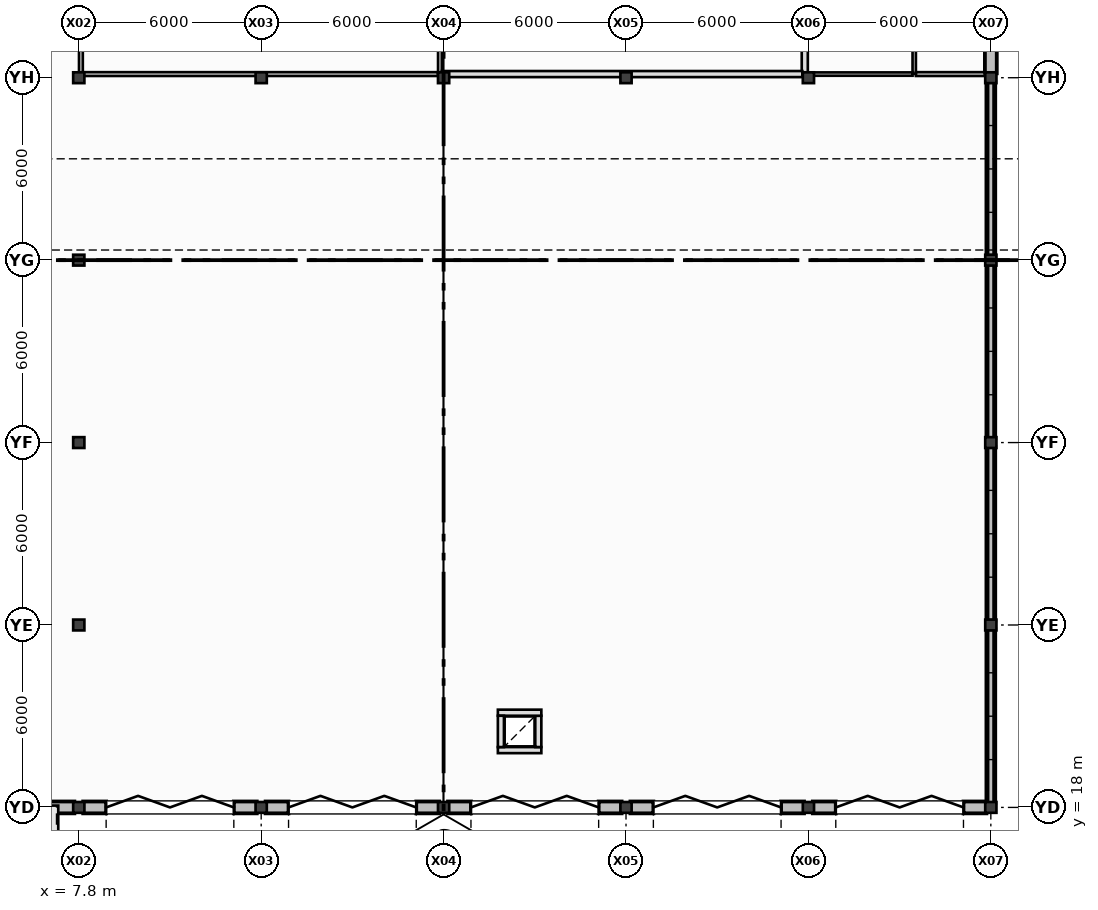
"""IFC4 building model, lengths in metres.
Left out: names, types, materials, properties, quantities, classifications, styles, units other than length and angle.
Written with IfcOpenShell. Run it as: python <this file> out.ifc"""

import sys

from ifc_helpers import new_model, si_unit, direction, frame, frame_2d, origin, origin_2d, place, context, subcontext, project, spatial, rectangle, i_section, extrude, element, fill, save


model = new_model("IFC4")
c1 = context("Model", 3, precision=1e-05, world=origin(), true_north=direction((0.0, 1.0)))
c2 = subcontext(c1, "Body", "Model", "MODEL_VIEW")
j1 = project(units=[si_unit("LENGTHUNIT", "METRE"), si_unit("PLANEANGLEUNIT", "RADIAN")], contexts=[c1])
p1 = place(None, origin())
s1 = spatial("IfcSite", under=j1, at=p1, CompositionType="ELEMENT")
p2 = place(p1, origin())
s2 = spatial("IfcBuilding", under=s1, at=p2, CompositionType="ELEMENT")
p3 = place(p2, origin())
s3 = spatial("IfcBuildingStorey", under=s2, at=p3, CompositionType="ELEMENT", Elevation=0.0)
for number, where, z_axis, x_axis in (
    (1, (7.8, 18.0, -0.41), (0.0, 0.0, 1.0), (1.0, 0.0, 0.0)),
    (2, (7.8, 24.0, -0.41), (0.0, 0.0, 1.0), (1.0, 0.0, 0.0)),
    (3, (7.8, 30.0, -0.41), (0.0, 0.0, 1.0), (1.0, 0.0, 0.0)),
    (4, (7.8, 36.0, -0.41), (0.0, 0.0, 1.0), (1.0, 0.0, 0.0)),
    (5, (7.8, 42.0, -0.41), (0.0, 0.0, 1.0), (1.0, 0.0, 0.0)),
    (6, (13.8, 18.0, -0.41), (0.0, 0.0, 1.0), (1.0, 0.0, 0.0)),
    (7, (13.8, 42.0, -0.41), (0.0, 0.0, 1.0), (1.0, 0.0, 0.0)),
    (8, (19.8, 18.0, -0.41), (0.0, 0.0, 1.0), (1.0, 0.0, 0.0)),
    (9, (19.8, 42.0, -0.41), (0.0, 0.0, 1.0), (1.0, 0.0, 0.0)),
    (10, (25.8, 18.0, -0.41), (0.0, 0.0, 1.0), (1.0, 0.0, 0.0)),
    (11, (25.8, 42.0, -0.41), (0.0, 0.0, 1.0), (1.0, 0.0, 0.0)),
    (12, (31.8, 18.0, -0.41), (0.0, 0.0, 1.0), (1.0, 0.0, 0.0)),
    (13, (31.8, 42.0, -0.41), (0.0, 0.0, 1.0), (1.0, 0.0, 0.0)),
    (14, (37.8, 18.0, -0.41), (0.0, 0.0, 1.0), (1.0, 0.0, 0.0)),
    (15, (37.8, 24.0, -0.41), (0.0, 0.0, 1.0), (1.0, 0.0, 0.0)),
    (16, (37.8, 30.0, -0.41), (0.0, 0.0, 1.0), (1.0, 0.0, 0.0)),
    (17, (37.8, 36.0, -0.41), (0.0, 0.0, 1.0), (1.0, 0.0, 0.0)),
    (18, (37.8, 42.0, -0.41), (0.0, 0.0, 1.0), (1.0, 0.0, 0.0)),
):
    element("IfcColumn", number, at=place(p3, frame(where, z_axis=z_axis, x_axis=x_axis)), inside=s3, PredefinedType="COLUMN", context=c2, shape_type="SweptSolid", body=[
        extrude(i_section(OverallWidth=0.369, OverallDepth=0.356, WebThickness=0.011, FlangeThickness=0.018, at=origin_2d()), origin(), (0.0, 0.0, 1.0), 6.41),
    ])
p4 = place(p3, frame((1.945, 18.0, 0.0), z_axis=(0.0, 0.0, 1.0), x_axis=(1.0, 0.0, 0.0)))
e19 = element("IfcWall", 19, at=p4, inside=s3, PredefinedType="STANDARD", context=c2, shape_type="SweptSolid", body=[
    extrude(rectangle(XDim=5.71, YDim=0.39, at=frame_2d((2.855, 0.0))), origin(), (0.0, 0.0, 1.0), 5.433),
])
p5 = place(p4, frame((2.93, 0.0, 0.0)))
e20 = element("IfcOpeningElement", 20, at=p5, cuts=e19, PredefinedType="OPENING", context=c2, shape_type="SweptSolid", body=[
    extrude(rectangle(XDim=1.95, YDim=2.35, at=frame_2d((0.975, 1.175))), frame((0.0, 0.205, 0.0), z_axis=(0.0, -1.0, 0.0), x_axis=(1.0, 0.0, 0.0)), (0.0, 0.0, 1.0), 0.41),
])
p6 = place(p3, frame((7.945, 18.0, 0.0), z_axis=(0.0, 0.0, 1.0), x_axis=(1.0, 0.0, 0.0)))
e21 = element("IfcWall", 21, at=p6, inside=s3, PredefinedType="STANDARD", context=c2, shape_type="SweptSolid", body=[
    extrude(rectangle(XDim=5.71, YDim=0.39, at=frame_2d((2.855, 0.0))), origin(), (0.0, 0.0, 1.0), 6.0),
])
p7 = place(p6, frame((0.755, 0.0, 0.0)))
e22 = element("IfcOpeningElement", 22, at=p7, cuts=e21, PredefinedType="OPENING", context=c2, shape_type="SweptSolid", body=[
    extrude(rectangle(XDim=4.2, YDim=4.45, at=frame_2d((2.1, 2.225))), frame((0.0, 0.205, 0.0), z_axis=(0.0, -1.0, 0.0), x_axis=(1.0, 0.0, 0.0)), (0.0, 0.0, 1.0), 0.41),
])
p8 = place(p3, frame((13.945, 18.0, 0.0), z_axis=(0.0, 0.0, 1.0), x_axis=(1.0, 0.0, 0.0)))
e23 = element("IfcWall", 23, at=p8, inside=s3, PredefinedType="STANDARD", context=c2, shape_type="SweptSolid", body=[
    extrude(rectangle(XDim=5.71, YDim=0.39, at=frame_2d((2.855, 0.0))), origin(), (0.0, 0.0, 1.0), 6.0),
])
p9 = place(p8, frame((0.755, 0.0, 0.0)))
e24 = element("IfcOpeningElement", 24, at=p9, cuts=e23, PredefinedType="OPENING", context=c2, shape_type="SweptSolid", body=[
    extrude(rectangle(XDim=4.2, YDim=4.45, at=frame_2d((2.1, 2.225))), frame((0.0, 0.205, 0.0), z_axis=(0.0, -1.0, 0.0), x_axis=(1.0, 0.0, 0.0)), (0.0, 0.0, 1.0), 0.41),
])
p10 = place(p3, frame((19.945, 18.0, 0.0), z_axis=(0.0, 0.0, 1.0), x_axis=(1.0, 0.0, 0.0)))
e25 = element("IfcWall", 25, at=p10, inside=s3, PredefinedType="STANDARD", context=c2, shape_type="SweptSolid", body=[
    extrude(rectangle(XDim=5.71, YDim=0.39, at=frame_2d((2.855, 0.0))), origin(), (0.0, 0.0, 1.0), 6.0),
])
p11 = place(p10, frame((0.755, 0.0, 0.0)))
e26 = element("IfcOpeningElement", 26, at=p11, cuts=e25, PredefinedType="OPENING", context=c2, shape_type="SweptSolid", body=[
    extrude(rectangle(XDim=4.2, YDim=4.45, at=frame_2d((2.1, 2.225))), frame((0.0, 0.205, 0.0), z_axis=(0.0, -1.0, 0.0), x_axis=(1.0, 0.0, 0.0)), (0.0, 0.0, 1.0), 0.41),
])
p12 = place(p3, frame((25.945, 18.0, 0.0), z_axis=(0.0, 0.0, 1.0), x_axis=(1.0, 0.0, 0.0)))
e27 = element("IfcWall", 27, at=p12, inside=s3, PredefinedType="STANDARD", context=c2, shape_type="SweptSolid", body=[
    extrude(rectangle(XDim=5.71, YDim=0.39, at=frame_2d((2.855, 0.0))), origin(), (0.0, 0.0, 1.0), 6.0),
])
p13 = place(p12, frame((0.755, 0.0, 0.0)))
e28 = element("IfcOpeningElement", 28, at=p13, cuts=e27, PredefinedType="OPENING", context=c2, shape_type="SweptSolid", body=[
    extrude(rectangle(XDim=4.2, YDim=4.45, at=frame_2d((2.1, 2.225))), frame((0.0, 0.205, 0.0), z_axis=(0.0, -1.0, 0.0), x_axis=(1.0, 0.0, 0.0)), (0.0, 0.0, 1.0), 0.41),
])
p14 = place(p3, frame((31.945, 18.0, 0.0), z_axis=(0.0, 0.0, 1.0), x_axis=(1.0, 0.0, 0.0)))
e29 = element("IfcWall", 29, at=p14, inside=s3, PredefinedType="STANDARD", context=c2, shape_type="SweptSolid", body=[
    extrude(rectangle(XDim=5.71, YDim=0.39, at=frame_2d((2.855, 0.0))), origin(), (0.0, 0.0, 1.0), 6.0),
])
p15 = place(p14, frame((0.755, 0.0, 0.0)))
e30 = element("IfcOpeningElement", 30, at=p15, cuts=e29, PredefinedType="OPENING", context=c2, shape_type="SweptSolid", body=[
    extrude(rectangle(XDim=4.2, YDim=4.45, at=frame_2d((2.1, 2.225))), frame((0.0, 0.205, 0.0), z_axis=(0.0, -1.0, 0.0), x_axis=(1.0, 0.0, 0.0)), (0.0, 0.0, 1.0), 0.41),
])
p16 = place(p3, frame((37.8, 18.145, 0.0), z_axis=(0.0, 0.0, 1.0), x_axis=(0.0, 1.0, 0.0)))
e31 = element("IfcWall", 31, at=p16, inside=s3, PredefinedType="STANDARD", context=c2, shape_type="SweptSolid", body=[
    extrude(rectangle(XDim=5.71, YDim=0.29, at=frame_2d((2.855, 0.0))), origin(), (0.0, 0.0, 1.0), 0.92),
])
p17 = place(p3, frame((37.8, 24.145, 0.0), z_axis=(0.0, 0.0, 1.0), x_axis=(0.0, 1.0, 0.0)))
e32 = element("IfcWall", 32, at=p17, inside=s3, PredefinedType="STANDARD", context=c2, shape_type="SweptSolid", body=[
    extrude(rectangle(XDim=5.71, YDim=0.29, at=frame_2d((2.855, 0.0))), origin(), (0.0, 0.0, 1.0), 0.32),
])
p18 = place(p3, frame((37.8, 30.145, 0.0), z_axis=(0.0, 0.0, 1.0), x_axis=(0.0, 1.0, 0.0)))
e33 = element("IfcWall", 33, at=p18, inside=s3, PredefinedType="STANDARD", context=c2, shape_type="SweptSolid", body=[
    extrude(rectangle(XDim=5.71, YDim=0.29, at=frame_2d((2.855, 0.0))), origin(), (0.0, 0.0, 1.0), 0.44),
])
p19 = place(p3, frame((37.8, 36.145, 0.0), z_axis=(0.0, 0.0, 1.0), x_axis=(0.0, 1.0, 0.0)))
e34 = element("IfcWall", 34, at=p19, inside=s3, PredefinedType="STANDARD", context=c2, shape_type="SweptSolid", body=[
    extrude(rectangle(XDim=5.71, YDim=0.29, at=frame_2d((2.855, 0.0))), origin(), (0.0, 0.0, 1.0), 0.56),
])
p20 = place(p3, frame((37.8, 42.145, 0.0), z_axis=(0.0, 0.0, 1.0), x_axis=(0.0, 1.0, 0.0)))
e35 = element("IfcWall", 35, at=p20, inside=s3, PredefinedType="STANDARD", context=c2, shape_type="SweptSolid", body=[
    extrude(rectangle(XDim=5.71, YDim=0.39, at=frame_2d((2.855, 0.0))), origin(), (0.0, 0.0, 1.0), 5.044),
])
p21 = place(p3, frame((21.585, 19.885, 0.0), z_axis=(0.0, 0.0, 1.0), x_axis=(1.0, 0.0, 0.0)))
e36 = element("IfcWall", 36, at=p21, inside=s3, PredefinedType="PARTITIONING", context=c2, shape_type="SweptSolid", body=[
    extrude(rectangle(XDim=1.43, YDim=0.2, at=frame_2d((0.715, 0.0))), origin(), (0.0, 0.0, 1.0), 5.68),
])
p22 = place(p3, frame((22.915, 19.985, 0.0), z_axis=(0.0, 0.0, 1.0), x_axis=(0.0, 1.0, 0.0)))
e37 = element("IfcWall", 37, at=p22, inside=s3, PredefinedType="PARTITIONING", context=c2, shape_type="SweptSolid", body=[
    extrude(rectangle(XDim=1.03, YDim=0.2, at=frame_2d((0.515, 0.0))), origin(), (0.0, 0.0, 1.0), 5.68),
])
p23 = place(p3, frame((23.015, 21.115, 0.0), z_axis=(0.0, 0.0, 1.0), x_axis=(-1.0, 0.0, 0.0)))
e38 = element("IfcWall", 38, at=p23, inside=s3, PredefinedType="PARTITIONING", context=c2, shape_type="SweptSolid", body=[
    extrude(rectangle(XDim=1.43, YDim=0.2, at=frame_2d((0.715, 0.0))), origin(), (0.0, 0.0, 1.0), 5.68),
])
p24 = place(p3, frame((21.685, 21.015, 0.0), z_axis=(0.0, 0.0, 1.0), x_axis=(0.0, -1.0, 0.0)))
e39 = element("IfcWall", 39, at=p24, inside=s3, PredefinedType="PARTITIONING", context=c2, shape_type="SweptSolid", body=[
    extrude(rectangle(XDim=1.03, YDim=0.2, at=frame_2d((0.515, 0.0))), origin(), (0.0, 0.0, 1.0), 5.68),
])
p25 = place(p3, frame((7.87, 42.117, 0.0), z_axis=(0.0, 0.0, 1.0), x_axis=(0.0, 1.0, 0.0)))
e40 = element("IfcWall", 40, at=p25, inside=s3, PredefinedType="PARTITIONING", context=c2, shape_type="SweptSolid", body=[
    extrude(rectangle(XDim=6.015, YDim=0.125, at=frame_2d((3.008, 0.0))), origin(), (0.0, 0.0, 1.0), 5.044),
])
p26 = place(p25, frame((2.218, 0.0, 0.0)))
e41 = element("IfcOpeningElement", 41, at=p26, cuts=e40, PredefinedType="OPENING", context=c2, shape_type="SweptSolid", body=[
    extrude(rectangle(XDim=1.58, YDim=2.2, at=frame_2d((0.79, 1.1))), frame((0.0, 0.073, 0.0), z_axis=(0.0, -1.0, 0.0), x_axis=(1.0, 0.0, 0.0)), (0.0, 0.0, 1.0), 0.145),
])
p27 = place(p3, frame((19.68, 48.05, 0.0), z_axis=(0.0, 0.0, 1.0), x_axis=(0.0, -1.0, 0.0)))
e42 = element("IfcWall", 42, at=p27, inside=s3, PredefinedType="PARTITIONING", context=c2, shape_type="SweptSolid", body=[
    extrude(rectangle(XDim=5.933, YDim=0.125, at=frame_2d((2.966, 0.0))), origin(), (0.0, 0.0, 1.0), 5.044),
])
p28 = place(p3, frame((19.617, 42.12, 0.0), z_axis=(0.0, 0.0, 1.0), x_axis=(-1.0, 0.0, 0.0)))
e43 = element("IfcWall", 43, at=p28, inside=s3, PredefinedType="PARTITIONING", context=c2, shape_type="SweptSolid", body=[
    extrude(rectangle(XDim=11.685, YDim=0.125, at=frame_2d((5.842, 0.0))), origin(), (0.0, 0.0, 1.0), 5.113),
])
p29 = place(p3, frame((31.68, 48.05, 0.0), z_axis=(0.0, 0.0, 1.0), x_axis=(0.0, -1.0, 0.0)))
e44 = element("IfcWall", 44, at=p29, inside=s3, PredefinedType="PARTITIONING", context=c2, shape_type="SweptSolid", body=[
    extrude(rectangle(XDim=5.97, YDim=0.2, at=frame_2d((2.985, 0.0))), origin(), (0.0, 0.0, 1.0), 5.044),
])
p30 = place(p3, frame((31.6, 42.12, 0.0), z_axis=(0.0, 0.0, 1.0), x_axis=(-1.0, 0.0, 0.0)))
e45 = element("IfcWall", 45, at=p30, inside=s3, PredefinedType="PARTITIONING", context=c2, shape_type="SweptSolid", body=[
    extrude(rectangle(XDim=11.858, YDim=0.2, at=frame_2d((5.929, 0.0))), origin(), (0.0, 0.0, 1.0), 5.113),
])
p31 = place(p3, frame((35.28, 48.05, 0.0), z_axis=(0.0, 0.0, 1.0), x_axis=(0.0, -1.0, 0.0)))
e46 = element("IfcWall", 46, at=p31, inside=s3, PredefinedType="PARTITIONING", context=c2, shape_type="SweptSolid", body=[
    extrude(rectangle(XDim=5.925, YDim=0.11, at=frame_2d((2.962, 0.0))), origin(), (0.0, 0.0, 1.0), 5.68),
])
p32 = place(p3, frame((35.225, 42.12, 0.0), z_axis=(0.0, 0.0, 1.0), x_axis=(-1.0, 0.0, 0.0)))
e47 = element("IfcWall", 47, at=p32, inside=s3, PredefinedType="PARTITIONING", context=c2, shape_type="SweptSolid", body=[
    extrude(rectangle(XDim=3.445, YDim=0.11, at=frame_2d((1.723, 0.0))), origin(), (0.0, 0.0, 1.0), 5.113),
])
p33 = place(p3, frame((37.605, 42.12, 0.0), z_axis=(0.0, 0.0, 1.0), x_axis=(-1.0, 0.0, 0.0)))
e48 = element("IfcWall", 48, at=p33, inside=s3, PredefinedType="PARTITIONING", context=c2, shape_type="SweptSolid", body=[
    extrude(rectangle(XDim=2.27, YDim=0.125, at=frame_2d((1.135, 0.0))), origin(), (0.0, 0.0, 1.0), 5.113),
])
p34 = place(p7, frame((4.2, 0.0, 0.0), z_axis=(0.0, 0.0, 1.0), x_axis=(-1.0, 0.0, 0.0)))
e49 = element("IfcDoor", 49, at=p34, inside=s3, OperationType="ROLLINGUP", PredefinedType="DOOR", context=c2, shape_type="SweptSolid", body=[
    extrude(rectangle(XDim=4.2, YDim=4.45, at=frame_2d((2.1, 2.225))), frame((0.0, 0.025, 0.0), z_axis=(0.0, -1.0, 0.0), x_axis=(1.0, 0.0, 0.0)), (0.0, 0.0, 1.0), 0.05),
])
fill(e22, e49)
p35 = place(p9, frame((4.2, 0.0, 0.0), z_axis=(0.0, 0.0, 1.0), x_axis=(-1.0, 0.0, 0.0)))
e50 = element("IfcDoor", 50, at=p35, inside=s3, OperationType="ROLLINGUP", PredefinedType="DOOR", context=c2, shape_type="SweptSolid", body=[
    extrude(rectangle(XDim=4.2, YDim=4.45, at=frame_2d((2.1, 2.225))), frame((0.0, 0.025, 0.0), z_axis=(0.0, -1.0, 0.0), x_axis=(1.0, 0.0, 0.0)), (0.0, 0.0, 1.0), 0.05),
])
fill(e24, e50)
p36 = place(p11, frame((4.2, 0.0, 0.0), z_axis=(0.0, 0.0, 1.0), x_axis=(-1.0, 0.0, 0.0)))
e51 = element("IfcDoor", 51, at=p36, inside=s3, OperationType="ROLLINGUP", PredefinedType="DOOR", context=c2, shape_type="SweptSolid", body=[
    extrude(rectangle(XDim=4.2, YDim=4.45, at=frame_2d((2.1, 2.225))), frame((0.0, 0.025, 0.0), z_axis=(0.0, -1.0, 0.0), x_axis=(1.0, 0.0, 0.0)), (0.0, 0.0, 1.0), 0.05),
])
fill(e26, e51)
p37 = place(p13, frame((4.2, 0.0, 0.0), z_axis=(0.0, 0.0, 1.0), x_axis=(-1.0, 0.0, 0.0)))
e52 = element("IfcDoor", 52, at=p37, inside=s3, OperationType="ROLLINGUP", PredefinedType="DOOR", context=c2, shape_type="SweptSolid", body=[
    extrude(rectangle(XDim=4.2, YDim=4.45, at=frame_2d((2.1, 2.225))), frame((0.0, 0.025, 0.0), z_axis=(0.0, -1.0, 0.0), x_axis=(1.0, 0.0, 0.0)), (0.0, 0.0, 1.0), 0.05),
])
fill(e28, e52)
p38 = place(p15, frame((4.2, 0.0, 0.0), z_axis=(0.0, 0.0, 1.0), x_axis=(-1.0, 0.0, 0.0)))
e53 = element("IfcDoor", 53, at=p38, inside=s3, OperationType="ROLLINGUP", PredefinedType="DOOR", context=c2, shape_type="SweptSolid", body=[
    extrude(rectangle(XDim=4.2, YDim=4.45, at=frame_2d((2.1, 2.225))), frame((0.0, 0.025, 0.0), z_axis=(0.0, -1.0, 0.0), x_axis=(1.0, 0.0, 0.0)), (0.0, 0.0, 1.0), 0.05),
])
fill(e30, e53)
save(model, sys.argv[1])
